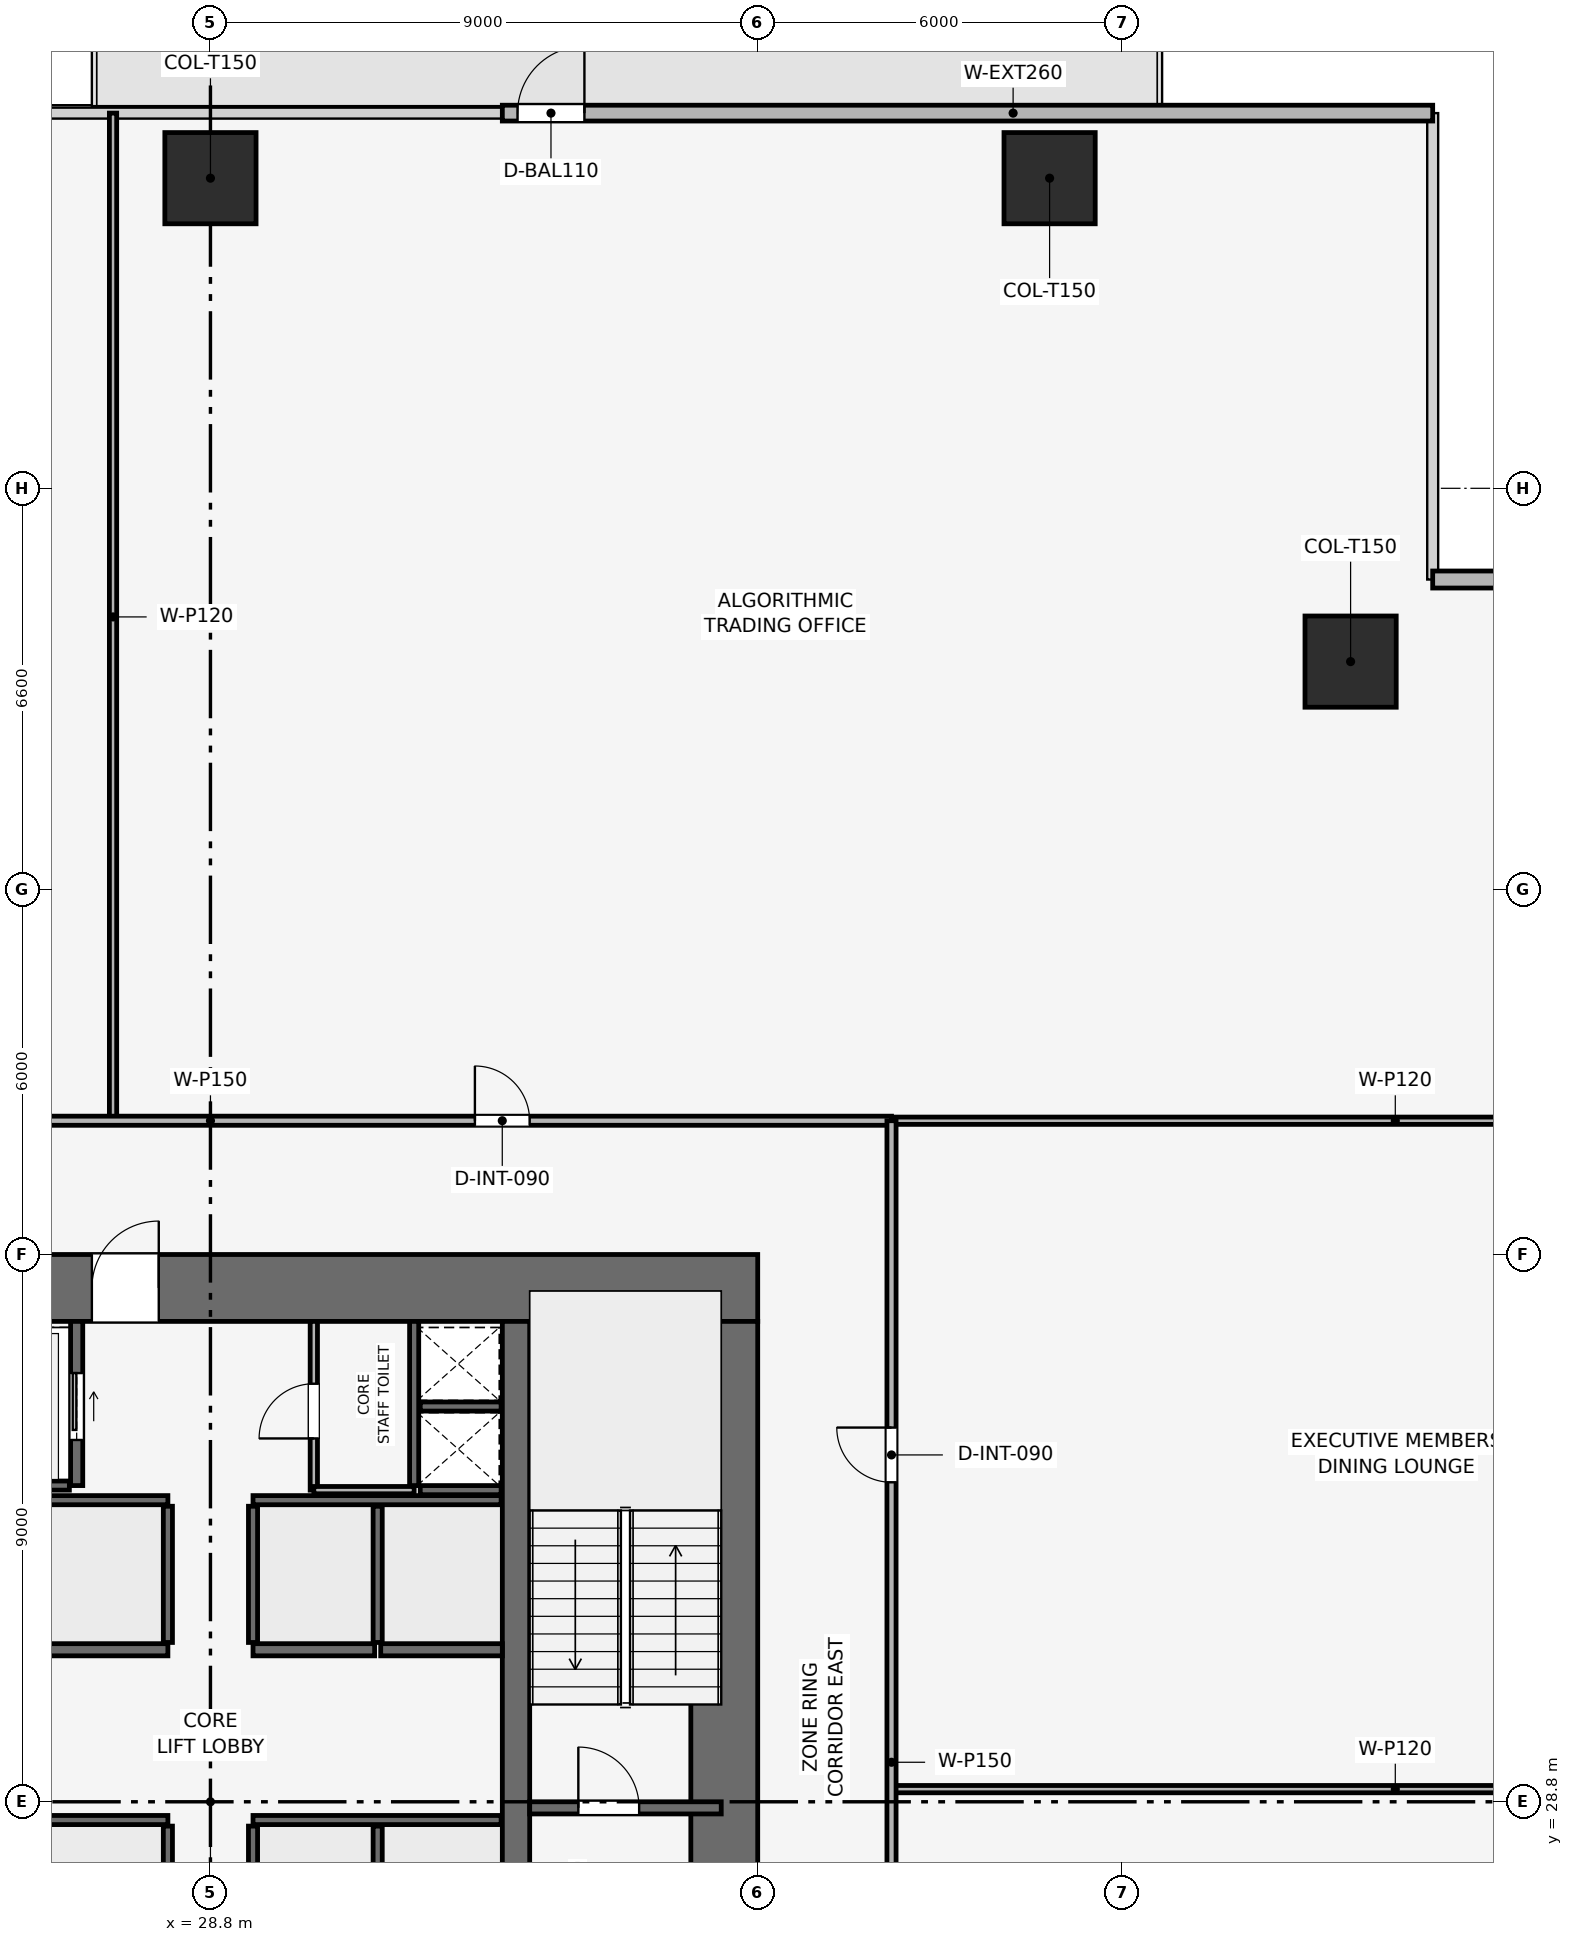
"""IFC4 building model, lengths in metres.
Left out: names, types, materials, properties, quantities, classifications, styles, units other than length and angle.
Written with IfcOpenShell. Run it as: python <this file> out.ifc"""

import sys

from ifc_helpers import new_model, si_unit, direction, frame, frame_2d, origin, origin_2d, place, context, subcontext, project, spatial, rectangle, extrude, element, fill, save


model = new_model("IFC4")
c1 = context("Model", 3, precision=1e-05, world=origin(), true_north=direction((0.0, 1.0)))
c2 = subcontext(c1, "Body", "Model", "MODEL_VIEW")
j1 = project(units=[si_unit("LENGTHUNIT", "METRE"), si_unit("PLANEANGLEUNIT", "RADIAN")], contexts=[c1])
p1 = place(None, origin())
s1 = spatial("IfcSite", under=j1, at=p1, CompositionType="ELEMENT")
p2 = place(p1, origin())
s2 = spatial("IfcBuilding", under=s1, at=p2, CompositionType="ELEMENT")
p3 = place(p2, frame((0.0, 0.0, 30.0)))
s3 = spatial("IfcBuildingStorey", under=s2, at=p3, CompositionType="ELEMENT", Elevation=30.0)
p4 = place(p3, frame((19.8, 37.25, 0.0), z_axis=(0.0, 0.0, 1.0), x_axis=(1.0, 0.0, 0.0)))
e1 = element("IfcWall", 1, at=p4, inside=s3, PredefinedType="SHEAR", context=c2, shape_type="SweptSolid", body=[
    extrude(rectangle(XDim=18.0, YDim=1.1, at=frame_2d((9.0, 0.0))), origin(), (0.0, 0.0, 1.0), 3.9),
])
p5 = place(p4, frame((7.05, 0.0, 0.0)))
e2 = element("IfcOpeningElement", 2, at=p5, cuts=e1, PredefinedType="OPENING", context=c2, shape_type="SweptSolid", body=[
    extrude(rectangle(XDim=1.1, YDim=2.15, at=frame_2d((0.55, 1.075))), frame((0.0, 0.56, 0.0), z_axis=(0.0, -1.0, 0.0), x_axis=(1.0, 0.0, 0.0)), (0.0, 0.0, 1.0), 1.12),
])
p6 = place(p3, frame((37.25, 20.9, 0.0), z_axis=(0.0, 0.0, 1.0), x_axis=(0.0, 1.0, 0.0)))
e3 = element("IfcWall", 3, at=p6, inside=s3, PredefinedType="SHEAR", context=c2, shape_type="SweptSolid", body=[
    extrude(rectangle(XDim=15.8, YDim=1.1, at=frame_2d((7.9, 0.0))), origin(), (0.0, 0.0, 1.0), 3.9),
])
p7 = place(p6, frame((4.4, 0.0, 0.0)))
e4 = element("IfcOpeningElement", 4, at=p7, cuts=e3, PredefinedType="OPENING", context=c2, shape_type="SweptSolid", body=[
    extrude(rectangle(XDim=1.1, YDim=2.15, at=frame_2d((0.55, 1.075))), frame((0.0, 0.56, 0.0), z_axis=(0.0, -1.0, 0.0), x_axis=(1.0, 0.0, 0.0)), (0.0, 0.0, 1.0), 1.12),
])
p8 = place(p3, frame((33.825, 20.9, 0.0), z_axis=(0.0, 0.0, 1.0), x_axis=(0.0, 1.0, 0.0)))
e5 = element("IfcWall", 5, at=p8, inside=s3, PredefinedType="SHEAR", context=c2, shape_type="SweptSolid", body=[
    extrude(rectangle(XDim=15.8, YDim=0.45, at=frame_2d((7.9, 0.0))), origin(), (0.0, 0.0, 1.0), 3.9),
])
for number, where, z_axis, x_axis in (
    (6, (42.6, 55.5, 0.003), (0.0, 0.0, 1.0), (1.0, 0.0, 0.0)),
    (7, (28.8, 55.5, 0.003), (0.0, 0.0, 1.0), (1.0, 0.0, 0.0)),
    (8, (47.55, 47.55, 0.003), (0.0, 0.0, 1.0), (1.0, 0.0, 0.0)),
):
    element("IfcColumn", number, at=place(p3, frame(where, z_axis=z_axis, x_axis=x_axis)), inside=s3, PredefinedType="COLUMN", context=c2, shape_type="SweptSolid", body=[
        extrude(rectangle(XDim=1.5, YDim=1.5, at=origin_2d()), origin(), (0.0, 0.0, 1.0), 3.644),
    ])
p9 = place(p3, frame((33.6, 56.57, 0.0), z_axis=(0.0, 0.0, 1.0), x_axis=(1.0, 0.0, 0.0)))
e9 = element("IfcWall", 9, at=p9, inside=s3, PredefinedType="SOLIDWALL", context=c2, shape_type="SweptSolid", body=[
    extrude(rectangle(XDim=15.3, YDim=0.26, at=frame_2d((7.65, 0.0))), origin(), (0.0, 0.0, 1.0), 3.65),
])
p10 = place(p9, frame((0.25, 0.0, 0.0)))
e10 = element("IfcOpeningElement", 10, at=p10, cuts=e9, PredefinedType="OPENING", context=c2, shape_type="SweptSolid", body=[
    extrude(rectangle(XDim=1.1, YDim=2.2, at=frame_2d((0.55, 1.1))), frame((0.0, 0.14, 0.0), z_axis=(0.0, -1.0, 0.0), x_axis=(1.0, 0.0, 0.0)), (0.0, 0.0, 1.0), 0.28),
])
p11 = place(p3, frame((48.9, 48.9, 0.0), z_axis=(0.0, 0.0, 1.0), x_axis=(1.0, 0.0, 0.0)))
e11 = element("IfcWall", 11, at=p11, inside=s3, PredefinedType="SOLIDWALL", context=c2, shape_type="SweptSolid", body=[
    extrude(rectangle(XDim=7.67, YDim=0.28, at=frame_2d((3.835, 0.0))), origin(), (0.0, 0.0, 1.0), 3.65),
])
p12 = place(p11, frame((2.585, 0.0, 0.9)))
e12 = element("IfcOpeningElement", 12, at=p12, cuts=e11, PredefinedType="OPENING", context=c2, shape_type="SweptSolid", body=[
    extrude(rectangle(XDim=2.5, YDim=1.9, at=frame_2d((1.25, 0.95))), frame((0.0, 0.15, 0.0), z_axis=(0.0, -1.0, 0.0), x_axis=(1.0, 0.0, 0.0)), (0.0, 0.0, 1.0), 0.3),
])
p13 = place(p3, frame((34.05, 28.7, 0.0), z_axis=(0.0, 0.0, 1.0), x_axis=(1.0, 0.0, 0.0)))
e13 = element("IfcWall", 13, at=p13, inside=s3, PredefinedType="SHEAR", context=c2, shape_type="SweptSolid", body=[
    extrude(rectangle(XDim=3.15, YDim=0.2, at=frame_2d((1.575, 0.0))), origin(), (0.0, 0.0, 1.0), 3.65),
])
p14 = place(p13, frame((0.8, 0.0, 0.0)))
e14 = element("IfcOpeningElement", 14, at=p14, cuts=e13, PredefinedType="OPENING", context=c2, shape_type="SweptSolid", body=[
    extrude(rectangle(XDim=1.0, YDim=2.1, at=frame_2d((0.5, 1.05))), frame((0.0, 0.11, 0.0), z_axis=(0.0, -1.0, 0.0), x_axis=(1.0, 0.0, 0.0)), (0.0, 0.0, 1.0), 0.22),
])
p15 = place(p3, frame((32.15, 34.0, 0.0), z_axis=(0.0, 0.0, 1.0), x_axis=(0.0, 1.0, 0.0)))
e15 = element("IfcWall", 15, at=p15, inside=s3, PredefinedType="SHEAR", context=c2, shape_type="SweptSolid", body=[
    extrude(rectangle(XDim=2.7, YDim=0.15, at=frame_2d((1.35, 0.0))), origin(), (0.0, 0.0, 1.0), 3.65),
])
for number, where, z_axis, x_axis in (
    (16, (32.25, 33.925, 0.0), (0.0, 0.0, 1.0), (1.0, 0.0, 0.0)),
    (17, (32.25, 35.3, 0.0), (0.0, 0.0, 1.0), (1.0, 0.0, 0.0)),
):
    element("IfcWall", number, at=place(p3, frame(where, z_axis=z_axis, x_axis=x_axis)), inside=s3, PredefinedType="SHEAR", context=c2, shape_type="SweptSolid", body=[
        extrude(rectangle(XDim=1.33, YDim=0.15, at=frame_2d((0.665, 0.0))), origin(), (0.0, 0.0, 1.0), 3.65),
    ])
p16 = place(p3, frame((26.6, 34.0, 0.0), z_axis=(0.0, 0.0, 1.0), x_axis=(0.0, 1.0, 0.0)))
e18 = element("IfcWall", 18, at=p16, inside=s3, PredefinedType="SHEAR", context=c2, shape_type="SweptSolid", body=[
    extrude(rectangle(XDim=2.7, YDim=0.2, at=frame_2d((1.35, 0.0))), origin(), (0.0, 0.0, 1.0), 3.65),
])
p17 = place(p16, frame((0.75, 0.0, 0.0)))
e19 = element("IfcOpeningElement", 19, at=p17, cuts=e18, PredefinedType="OPENING", context=c2, shape_type="SweptSolid", body=[
    extrude(rectangle(XDim=1.1, YDim=2.15, at=frame_2d((0.55, 1.075))), frame((0.0, 0.11, 0.0), z_axis=(0.0, -1.0, 0.0), x_axis=(1.0, 0.0, 0.0)), (0.0, 0.0, 1.0), 0.22),
])
p18 = place(p3, frame((24.0, 34.0, 0.0), z_axis=(0.0, 0.0, 1.0), x_axis=(1.0, 0.0, 0.0)))
e20 = element("IfcWall", 20, at=p18, inside=s3, PredefinedType="SHEAR", context=c2, shape_type="SweptSolid", body=[
    extrude(rectangle(XDim=2.48, YDim=0.15, at=frame_2d((1.24, 0.0))), origin(), (0.0, 0.0, 1.0), 3.65),
])
for number, where, z_axis, x_axis in (
    (21, (26.1, 31.3, 0.0), (0.0, 0.0, 1.0), (1.0, 0.0, 0.0)),
    (22, (29.5, 31.3, 0.0), (0.0, 0.0, 1.0), (1.0, 0.0, 0.0)),
    (23, (31.6, 31.3, 0.0), (0.0, 0.0, 1.0), (1.0, 0.0, 0.0)),
):
    element("IfcWall", number, at=place(p3, frame(where, z_axis=z_axis, x_axis=x_axis)), inside=s3, PredefinedType="SHEAR", context=c2, shape_type="SweptSolid", body=[
        extrude(rectangle(XDim=2.0, YDim=0.2, at=frame_2d((1.0, 0.0))), origin(), (0.0, 0.0, 1.0), 3.65),
    ])
for number, where, z_axis, x_axis in (
    (24, (24.02, 28.5, 0.0), (0.0, 0.0, 1.0), (1.0, 0.0, 0.0)),
    (25, (29.5, 28.5, 0.0), (0.0, 0.0, 1.0), (1.0, 0.0, 0.0)),
):
    element("IfcWall", number, at=place(p3, frame(where, z_axis=z_axis, x_axis=x_axis)), inside=s3, PredefinedType="SHEAR", context=c2, shape_type="SweptSolid", body=[
        extrude(rectangle(XDim=4.08, YDim=0.15, at=frame_2d((2.04, 0.0))), origin(), (0.0, 0.0, 1.0), 3.65),
    ])
for number, where, z_axis, x_axis in (
    (26, (28.1, 26.12, 0.0), (0.0, 0.0, 1.0), (0.0, 1.0, 0.0)),
    (27, (29.5, 26.12, 0.0), (0.0, 0.0, 1.0), (0.0, 1.0, 0.0)),
    (28, (31.55, 26.12, 0.0), (0.0, 0.0, 1.0), (0.0, 1.0, 0.0)),
):
    element("IfcWall", number, at=place(p3, frame(where, z_axis=z_axis, x_axis=x_axis)), inside=s3, PredefinedType="SHEAR", context=c2, shape_type="SweptSolid", body=[
        extrude(rectangle(XDim=2.28, YDim=0.15, at=frame_2d((1.14, 0.0))), origin(), (0.0, 0.0, 1.0), 3.65),
    ])
for number, where, z_axis, x_axis in (
    (29, (24.02, 33.76, 0.0), (0.0, 0.0, 1.0), (1.0, 0.0, 0.0)),
    (30, (29.5, 33.76, 0.0), (0.0, 0.0, 1.0), (1.0, 0.0, 0.0)),
):
    element("IfcWall", number, at=place(p3, frame(where, z_axis=z_axis, x_axis=x_axis)), inside=s3, PredefinedType="SHEAR", context=c2, shape_type="SweptSolid", body=[
        extrude(rectangle(XDim=4.08, YDim=0.15, at=frame_2d((2.04, 0.0))), origin(), (0.0, 0.0, 1.0), 3.65),
    ])
for number, where, z_axis, x_axis in (
    (31, (28.1, 31.42, 0.0), (0.0, 0.0, 1.0), (0.0, 1.0, 0.0)),
    (32, (29.5, 31.42, 0.0), (0.0, 0.0, 1.0), (0.0, 1.0, 0.0)),
    (33, (31.55, 31.42, 0.0), (0.0, 0.0, 1.0), (0.0, 1.0, 0.0)),
):
    element("IfcWall", number, at=place(p3, frame(where, z_axis=z_axis, x_axis=x_axis)), inside=s3, PredefinedType="SHEAR", context=c2, shape_type="SweptSolid", body=[
        extrude(rectangle(XDim=2.24, YDim=0.15, at=frame_2d((1.12, 0.0))), origin(), (0.0, 0.0, 1.0), 3.65),
    ])
p19 = place(p3, frame((30.5, 33.925, 0.0), z_axis=(0.0, 0.0, 1.0), x_axis=(0.0, 1.0, 0.0)))
e34 = element("IfcWall", 34, at=p19, inside=s3, PredefinedType="PARTITIONING", context=c2, shape_type="SweptSolid", body=[
    extrude(rectangle(XDim=2.775, YDim=0.12, at=frame_2d((1.387, 0.0))), origin(), (0.0, 0.0, 1.0), 3.65),
])
p20 = place(p19, frame((0.85, 0.0, 0.0)))
e35 = element("IfcOpeningElement", 35, at=p20, cuts=e34, PredefinedType="OPENING", context=c2, shape_type="SweptSolid", body=[
    extrude(rectangle(XDim=0.9, YDim=2.1, at=frame_2d((0.45, 1.05))), frame((0.0, 0.07, 0.0), z_axis=(0.0, -1.0, 0.0), x_axis=(1.0, 0.0, 0.0)), (0.0, 0.0, 1.0), 0.14),
])
p21 = place(p3, frame((30.5, 33.925, 0.0), z_axis=(0.0, 0.0, 1.0), x_axis=(1.0, 0.0, 0.0)))
e36 = element("IfcWall", 36, at=p21, inside=s3, PredefinedType="PARTITIONING", context=c2, shape_type="SweptSolid", body=[
    extrude(rectangle(XDim=1.65, YDim=0.12, at=frame_2d((0.825, 0.0))), origin(), (0.0, 0.0, 1.0), 3.65),
])
for number, where, z_axis, x_axis in (
    (37, (27.198, 40.0, 0.0), (0.0, 0.0, 1.0), (0.0, 1.0, 0.0)),
    (38, (40.0, 40.0, 0.0), (0.0, 0.0, 1.0), (1.0, 0.0, 0.0)),
    (39, (40.0, 29.008, 0.0), (0.0, 0.0, 1.0), (1.0, 0.0, 0.0)),
):
    element("IfcWall", number, at=place(p3, frame(where, z_axis=z_axis, x_axis=x_axis)), inside=s3, PredefinedType="PARTITIONING", context=c2, shape_type="SweptSolid", body=[
        extrude(rectangle(XDim=16.57, YDim=0.12, at=frame_2d((8.285, 0.0))), origin(), (0.0, 0.0, 1.0), 2.935),
    ])
p22 = place(p3, frame((17.6, 40.0, 0.0), z_axis=(0.0, 0.0, 1.0), x_axis=(1.0, 0.0, 0.0)))
e40 = element("IfcWall", 40, at=p22, inside=s3, PredefinedType="PARTITIONING", context=c2, shape_type="SweptSolid", body=[
    extrude(rectangle(XDim=22.4, YDim=0.15, at=frame_2d((11.2, 0.0))), origin(), (0.0, 0.0, 1.0), 3.085),
])
p23 = place(p22, frame((4.349, 0.0, 0.0)))
e41 = element("IfcOpeningElement", 41, at=p23, cuts=e40, PredefinedType="OPENING", context=c2, shape_type="SweptSolid", body=[
    extrude(rectangle(XDim=0.9, YDim=2.1, at=frame_2d((0.45, 1.05))), frame((0.0, 0.085, 0.0), z_axis=(0.0, -1.0, 0.0), x_axis=(1.0, 0.0, 0.0)), (0.0, 0.0, 1.0), 0.17),
])
p24 = place(p22, frame((15.549, 0.0, 0.0)))
e42 = element("IfcOpeningElement", 42, at=p24, cuts=e40, PredefinedType="OPENING", context=c2, shape_type="SweptSolid", body=[
    extrude(rectangle(XDim=0.9, YDim=2.1, at=frame_2d((0.45, 1.05))), frame((0.0, 0.085, 0.0), z_axis=(0.0, -1.0, 0.0), x_axis=(1.0, 0.0, 0.0)), (0.0, 0.0, 1.0), 0.17),
])
p25 = place(p3, frame((40.0, 17.6, 0.0), z_axis=(0.0, 0.0, 1.0), x_axis=(0.0, 1.0, 0.0)))
e43 = element("IfcWall", 43, at=p25, inside=s3, PredefinedType="PARTITIONING", context=c2, shape_type="SweptSolid", body=[
    extrude(rectangle(XDim=22.4, YDim=0.15, at=frame_2d((11.2, 0.0))), origin(), (0.0, 0.0, 1.0), 3.085),
])
p26 = place(p25, frame((0.7, 0.0, 0.0)))
e44 = element("IfcOpeningElement", 44, at=p26, cuts=e43, PredefinedType="OPENING", context=c2, shape_type="SweptSolid", body=[
    extrude(rectangle(XDim=0.9, YDim=2.1, at=frame_2d((0.45, 1.05))), frame((0.0, 0.085, 0.0), z_axis=(0.0, -1.0, 0.0), x_axis=(1.0, 0.0, 0.0)), (0.0, 0.0, 1.0), 0.17),
])
p27 = place(p25, frame((6.404, 0.0, 0.0)))
e45 = element("IfcOpeningElement", 45, at=p27, cuts=e43, PredefinedType="OPENING", context=c2, shape_type="SweptSolid", body=[
    extrude(rectangle(XDim=0.9, YDim=2.1, at=frame_2d((0.45, 1.05))), frame((0.0, 0.085, 0.0), z_axis=(0.0, -1.0, 0.0), x_axis=(1.0, 0.0, 0.0)), (0.0, 0.0, 1.0), 0.17),
])
p28 = place(p25, frame((16.454, 0.0, 0.0)))
e46 = element("IfcOpeningElement", 46, at=p28, cuts=e43, PredefinedType="OPENING", context=c2, shape_type="SweptSolid", body=[
    extrude(rectangle(XDim=0.9, YDim=2.1, at=frame_2d((0.45, 1.05))), frame((0.0, 0.085, 0.0), z_axis=(0.0, -1.0, 0.0), x_axis=(1.0, 0.0, 0.0)), (0.0, 0.0, 1.0), 0.17),
])
p29 = place(p10, origin())
e47 = element("IfcDoor", 47, at=p29, inside=s3, OperationType="SINGLE_SWING_RIGHT", PredefinedType="DOOR", context=c2, shape_type="SweptSolid", body=[
    extrude(rectangle(XDim=1.1, YDim=2.2, at=frame_2d((0.55, 1.1))), frame((0.0, 0.025, 0.0), z_axis=(0.0, -1.0, 0.0), x_axis=(1.0, 0.0, 0.0)), (0.0, 0.0, 1.0), 0.05),
])
fill(e10, e47)
p30 = place(p14, origin())
e48 = element("IfcDoor", 48, at=p30, inside=s3, OperationType="SINGLE_SWING_LEFT", PredefinedType="DOOR", context=c2, shape_type="SweptSolid", body=[
    extrude(rectangle(XDim=1.0, YDim=2.1, at=frame_2d((0.5, 1.05))), frame((0.0, 0.025, 0.0), z_axis=(0.0, -1.0, 0.0), x_axis=(1.0, 0.0, 0.0)), (0.0, 0.0, 1.0), 0.05),
])
fill(e14, e48)
p31 = place(p17, origin())
e49 = element("IfcDoor", 49, at=p31, inside=s3, OperationType="SLIDING_TO_RIGHT", PredefinedType="DOOR", context=c2, shape_type="SweptSolid", body=[
    extrude(rectangle(XDim=1.1, YDim=2.15, at=frame_2d((0.55, 1.075))), frame((0.0, 0.025, 0.0), z_axis=(0.0, -1.0, 0.0), x_axis=(1.0, 0.0, 0.0)), (0.0, 0.0, 1.0), 0.05),
])
fill(e19, e49)
p32 = place(p20, origin())
e50 = element("IfcDoor", 50, at=p32, inside=s3, OperationType="SINGLE_SWING_LEFT", PredefinedType="DOOR", context=c2, shape_type="SweptSolid", body=[
    extrude(rectangle(XDim=0.9, YDim=2.1, at=frame_2d((0.45, 1.05))), frame((0.0, 0.025, 0.0), z_axis=(0.0, -1.0, 0.0), x_axis=(1.0, 0.0, 0.0)), (0.0, 0.0, 1.0), 0.05),
])
fill(e35, e50)
p33 = place(p24, origin())
e51 = element("IfcDoor", 51, at=p33, inside=s3, OperationType="SINGLE_SWING_LEFT", PredefinedType="DOOR", context=c2, shape_type="SweptSolid", body=[
    extrude(rectangle(XDim=0.9, YDim=2.1, at=frame_2d((0.45, 1.05))), frame((0.0, 0.025, 0.0), z_axis=(0.0, -1.0, 0.0), x_axis=(1.0, 0.0, 0.0)), (0.0, 0.0, 1.0), 0.05),
])
fill(e42, e51)
p34 = place(p28, origin())
e52 = element("IfcDoor", 52, at=p34, inside=s3, OperationType="SINGLE_SWING_RIGHT", PredefinedType="DOOR", context=c2, shape_type="SweptSolid", body=[
    extrude(rectangle(XDim=0.9, YDim=2.1, at=frame_2d((0.45, 1.05))), frame((0.0, 0.025, 0.0), z_axis=(0.0, -1.0, 0.0), x_axis=(1.0, 0.0, 0.0)), (0.0, 0.0, 1.0), 0.05),
])
fill(e46, e52)
p35 = place(p5, origin())
e53 = element("IfcDoor", 53, at=p35, inside=s3, OperationType="SINGLE_SWING_RIGHT", PredefinedType="DOOR", context=c2, shape_type="SweptSolid", body=[
    extrude(rectangle(XDim=1.1, YDim=2.15, at=frame_2d((0.55, 1.075))), frame((0.0, 0.025, 0.0), z_axis=(0.0, -1.0, 0.0), x_axis=(1.0, 0.0, 0.0)), (0.0, 0.0, 1.0), 0.05),
])
fill(e2, e53)
save(model, sys.argv[1])
